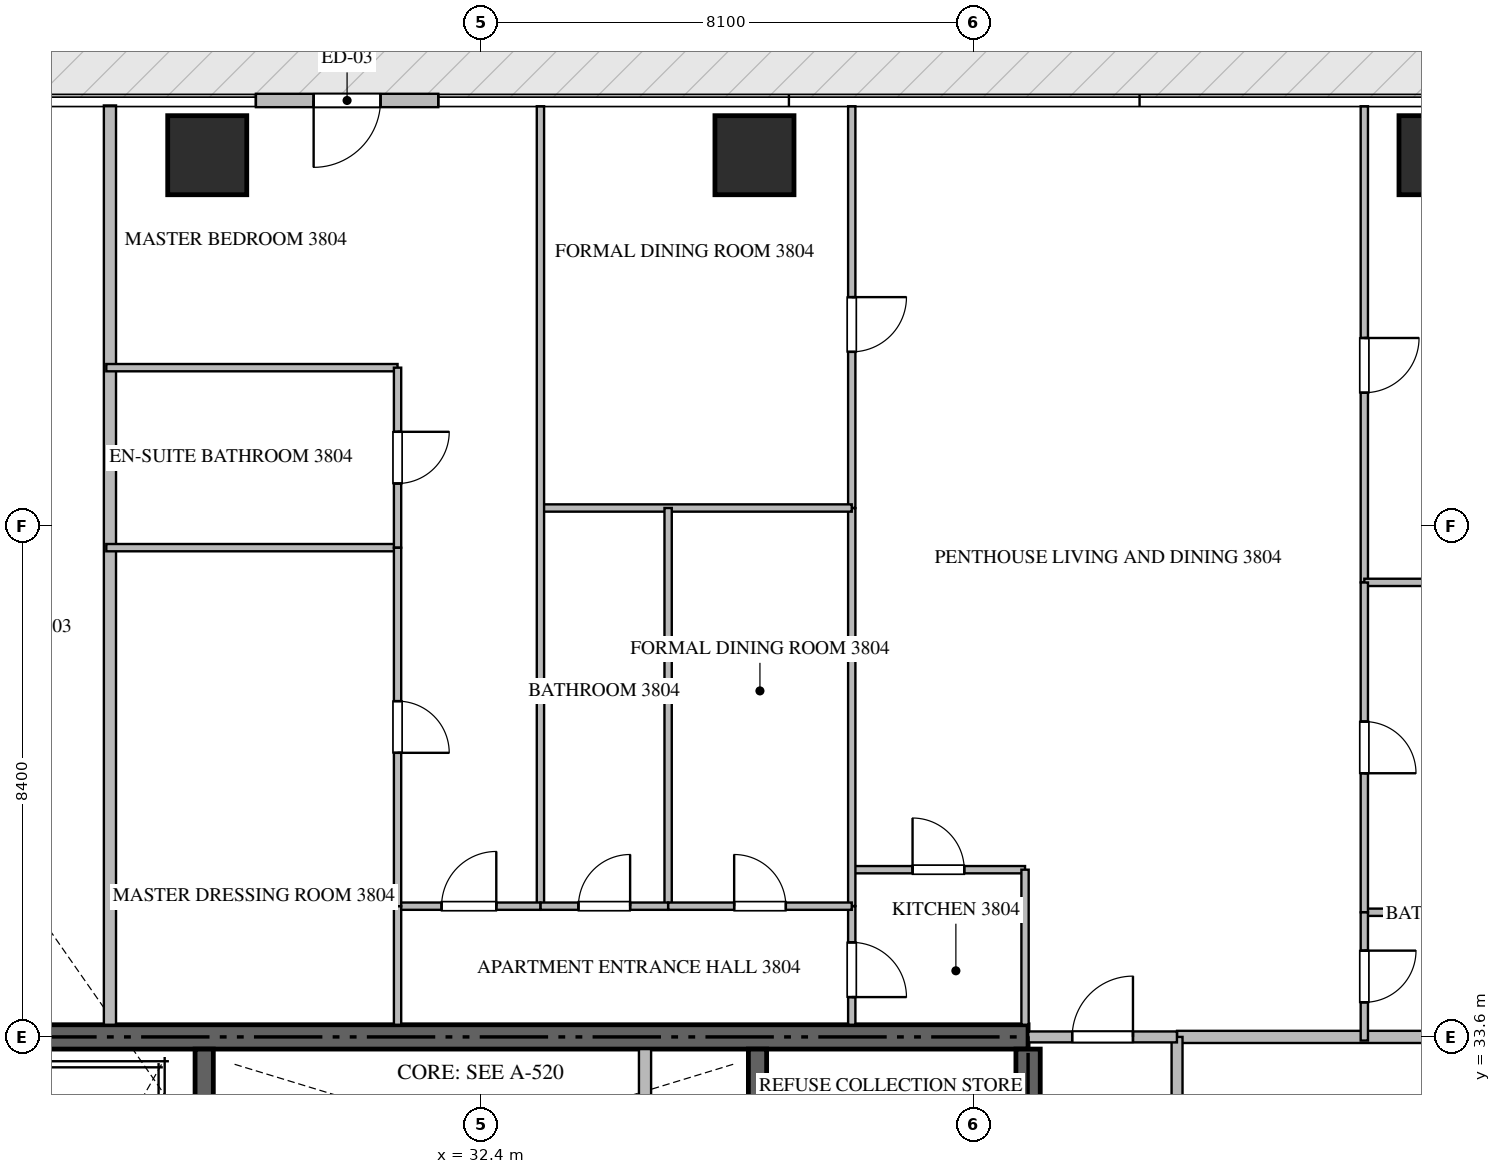
"""IFC4 building model, lengths in metres.
Left out: names, types, materials, properties, quantities, classifications, styles, units other than length and angle.
Written with IfcOpenShell. Run it as: python <this file> out.ifc"""

import sys

from ifc_helpers import new_model, si_unit, direction, frame, frame_2d, origin, origin_2d, place, context, subcontext, project, spatial, rectangle, extrude, source, transform, mapped, element, fill, save


model = new_model("IFC4")
c1 = context("Model", 3, precision=1e-05, world=origin(), true_north=direction((0.0, 1.0)))
c2 = subcontext(c1, "Body", "Model", "MODEL_VIEW")
j1 = project(units=[si_unit("LENGTHUNIT", "METRE"), si_unit("PLANEANGLEUNIT", "RADIAN")], contexts=[c1])
p1 = place(None, origin())
s1 = spatial("IfcSite", under=j1, at=p1, CompositionType="ELEMENT")
p2 = place(p1, origin())
s2 = spatial("IfcBuilding", under=s1, at=p2, CompositionType="ELEMENT")
p3 = place(p2, frame((0.0, 0.0, 153.9)))
s3 = spatial("IfcBuildingStorey", under=s2, at=p3, CompositionType="ELEMENT", Elevation=153.9)
p4 = place(p3, frame((41.4, 33.6, -0.26), z_axis=(0.0, 0.0, 1.0), x_axis=(-1.0, 0.0, 0.0)))
e1 = element("IfcWall", 1, at=p4, inside=s3, PredefinedType="SHEAR", context=c2, shape_type="SweptSolid", body=[
    extrude(rectangle(XDim=18.0, YDim=0.4, at=frame_2d((9.0, 0.0))), origin(), (0.0, 0.0, 1.0), 3.748),
])
p5 = place(p3, frame((41.4, 27.75, -0.26), z_axis=(0.0, 0.0, 1.0), x_axis=(0.0, 1.0, 0.0)))
e2 = element("IfcWall", 2, at=p5, inside=s3, PredefinedType="SHEAR", context=c2, shape_type="SweptSolid", body=[
    extrude(rectangle(XDim=5.65, YDim=0.4, at=frame_2d((2.825, 0.0))), origin(), (0.0, 0.0, 1.0), 3.748),
])
p6 = place(p3, frame((27.85, 23.55, -0.26), z_axis=(0.0, 0.0, 1.0), x_axis=(0.0, 1.0, 0.0)))
e3 = element("IfcWall", 3, at=p6, inside=s3, PredefinedType="SHEAR", context=c2, shape_type="SweptSolid", body=[
    extrude(rectangle(XDim=9.85, YDim=0.3, at=frame_2d((4.925, 0.0))), origin(), (0.0, 0.0, 1.0), 3.748),
])
p7 = place(p3, frame((36.95, 27.05, -0.26), z_axis=(0.0, 0.0, 1.0), x_axis=(0.0, 1.0, 0.0)))
e4 = element("IfcWall", 4, at=p7, inside=s3, PredefinedType="SHEAR", context=c2, shape_type="SweptSolid", body=[
    extrude(rectangle(XDim=6.35, YDim=0.3, at=frame_2d((3.175, 0.0))), origin(), (0.0, 0.0, 1.0), 3.748),
])
m1 = source(origin(), c2, "Body", "SweptSolid", [
    extrude(rectangle(XDim=1.3, YDim=1.3, at=origin_2d()), origin(), (0.0, 0.0, 1.0), 3.75),
])
for number, where, z_axis, x_axis in (
    (5, (27.9, 48.1, -0.26), (0.0, 0.0, 1.0), (1.0, 0.0, 0.0)),
    (6, (36.9, 48.1, -0.26), (0.0, 0.0, 1.0), (1.0, 0.0, 0.0)),
    (7, (48.15, 48.1, -0.26), (0.0, 0.0, 1.0), (1.0, 0.0, 0.0)),
):
    element("IfcColumn", number, at=place(p3, frame(where, z_axis=z_axis, x_axis=x_axis)), inside=s3, PredefinedType="COLUMN", context=c2, shape_type="MappedRepresentation", body=[
        mapped(m1, transform((0.0, 0.0, 0.0), scale=1.0)),
    ])
p8 = place(p3, frame((31.7, 49.0, 0.0), z_axis=(0.0, 0.0, 1.0), x_axis=(-1.0, 0.0, 0.0)))
e8 = element("IfcWall", 8, at=p8, inside=s3, PredefinedType="ELEMENTEDWALL", context=c2, shape_type="SweptSolid", body=[
    extrude(rectangle(XDim=3.0, YDim=0.22, at=frame_2d((1.5, 0.0))), origin(), (0.0, 0.0, 1.0), 3.475),
])
p9 = place(p8, frame((0.95, 0.0, 0.0)))
e9 = element("IfcOpeningElement", 9, at=p9, cuts=e8, PredefinedType="OPENING", context=c2, shape_type="SweptSolid", body=[
    extrude(rectangle(XDim=1.1, YDim=2.2, at=frame_2d((0.55, 1.1))), frame((0.0, 0.12, 0.0), z_axis=(0.0, -1.0, 0.0), x_axis=(1.0, 0.0, 0.0)), (0.0, 0.0, 1.0), 0.24),
])
p10 = place(p3, frame((35.1, 30.75, 0.0), z_axis=(0.0, 0.0, 1.0), x_axis=(0.0, 1.0, 0.0)))
e10 = element("IfcWall", 10, at=p10, inside=s3, PredefinedType="STANDARD", context=c2, shape_type="SweptSolid", body=[
    extrude(rectangle(XDim=2.65, YDim=0.2, at=frame_2d((1.325, 0.0))), origin(), (0.0, 0.0, 1.0), 3.49),
])
p11 = place(p3, frame((26.3, 33.8, 0.0), z_axis=(0.0, 0.0, 1.0), x_axis=(0.0, 1.0, 0.0)))
e11 = element("IfcWall", 11, at=p11, inside=s3, PredefinedType="PARTITIONING", context=c2, shape_type="SweptSolid", body=[
    extrude(rectangle(XDim=15.118, YDim=0.2, at=frame_2d((7.559, 0.0))), origin(), (0.0, 0.0, 1.0), 3.49),
])
p12 = place(p3, frame((43.85, 33.6, 0.0), z_axis=(0.0, 0.0, 1.0), x_axis=(1.0, 0.0, 0.0)))
e12 = element("IfcWall", 12, at=p12, inside=s3, PredefinedType="PARTITIONING", context=c2, shape_type="SweptSolid", body=[
    extrude(rectangle(XDim=13.068, YDim=0.2, at=frame_2d((6.534, 0.0))), origin(), (0.0, 0.0, 1.0), 3.49),
])
p13 = place(p3, frame((43.85, 14.9, 0.0), z_axis=(0.0, 0.0, 1.0), x_axis=(0.0, 1.0, 0.0)))
e13 = element("IfcWall", 13, at=p13, inside=s3, PredefinedType="PARTITIONING", context=c2, shape_type="SweptSolid", body=[
    extrude(rectangle(XDim=18.7, YDim=0.18, at=frame_2d((9.35, 0.0))), origin(), (0.0, 0.0, 1.0), 3.49),
])
p14 = place(p13, frame((1.805, 0.0, 0.0)))
e14 = element("IfcOpeningElement", 14, at=p14, cuts=e13, PredefinedType="OPENING", context=c2, shape_type="SweptSolid", body=[
    extrude(rectangle(XDim=1.0, YDim=2.15, at=frame_2d((0.5, 1.075))), frame((0.0, 0.1, 0.0), z_axis=(0.0, -1.0, 0.0), x_axis=(1.0, 0.0, 0.0)), (0.0, 0.0, 1.0), 0.2),
])
p15 = place(p3, frame((41.402, 33.6, 0.0), z_axis=(0.0, 0.0, 1.0), x_axis=(1.0, 0.0, 0.0)))
e15 = element("IfcWall", 15, at=p15, inside=s3, PredefinedType="PARTITIONING", context=c2, shape_type="SweptSolid", body=[
    extrude(rectangle(XDim=2.446, YDim=0.18, at=frame_2d((1.223, 0.0))), origin(), (0.0, 0.0, 1.0), 3.49),
])
p16 = place(p15, frame((0.723, 0.0, 0.0)))
e16 = element("IfcOpeningElement", 16, at=p16, cuts=e15, PredefinedType="OPENING", context=c2, shape_type="SweptSolid", body=[
    extrude(rectangle(XDim=1.0, YDim=2.15, at=frame_2d((0.5, 1.075))), frame((0.0, 0.1, 0.0), z_axis=(0.0, -1.0, 0.0), x_axis=(1.0, 0.0, 0.0)), (0.0, 0.0, 1.0), 0.2),
])
p17 = place(p3, frame((38.5, 36.35, 0.0), z_axis=(0.0, 0.0, 1.0), x_axis=(1.0, 0.0, 0.0)))
e17 = element("IfcWall", 17, at=p17, inside=s3, PredefinedType="PARTITIONING", context=c2, shape_type="SweptSolid", body=[
    extrude(rectangle(XDim=2.85, YDim=0.12, at=frame_2d((1.425, 0.0))), origin(), (0.0, 0.0, 1.0), 3.49),
])
p18 = place(p17, frame((1.0, 0.0, 0.0)))
e18 = element("IfcOpeningElement", 18, at=p18, cuts=e17, PredefinedType="OPENING", context=c2, shape_type="SweptSolid", body=[
    extrude(rectangle(XDim=0.85, YDim=2.1, at=frame_2d((0.425, 1.05))), frame((0.0, 0.07, 0.0), z_axis=(0.0, -1.0, 0.0), x_axis=(1.0, 0.0, 0.0)), (0.0, 0.0, 1.0), 0.14),
])
p19 = place(p3, frame((41.35, 36.35, 0.0), z_axis=(0.0, 0.0, 1.0), x_axis=(0.0, -1.0, 0.0)))
e19 = element("IfcWall", 19, at=p19, inside=s3, PredefinedType="PARTITIONING", context=c2, shape_type="SweptSolid", body=[
    extrude(rectangle(XDim=2.55, YDim=0.12, at=frame_2d((1.275, 0.0))), origin(), (0.0, 0.0, 1.0), 3.49),
])
p20 = place(p3, frame((38.5, 35.75, 0.0), z_axis=(0.0, 0.0, 1.0), x_axis=(0.0, -1.0, 0.0)))
e20 = element("IfcWall", 20, at=p20, inside=s3, PredefinedType="PARTITIONING", context=c2, shape_type="SweptSolid", body=[
    extrude(rectangle(XDim=1.95, YDim=0.12, at=frame_2d((0.975, 0.0))), origin(), (0.0, 0.0, 1.0), 3.49),
])
p21 = place(p20, frame((0.595, 0.0, 0.0)))
e21 = element("IfcOpeningElement", 21, at=p21, cuts=e20, PredefinedType="OPENING", context=c2, shape_type="SweptSolid", body=[
    extrude(rectangle(XDim=0.9, YDim=2.1, at=frame_2d((0.45, 1.05))), frame((0.0, 0.07, 0.0), z_axis=(0.0, -1.0, 0.0), x_axis=(1.0, 0.0, 0.0)), (0.0, 0.0, 1.0), 0.14),
])
p22 = place(p3, frame((38.5, 48.905, 0.0), z_axis=(0.0, 0.0, 1.0), x_axis=(0.0, -1.0, 0.0)))
e22 = element("IfcWall", 22, at=p22, inside=s3, PredefinedType="PARTITIONING", context=c2, shape_type="SweptSolid", body=[
    extrude(rectangle(XDim=6.607, YDim=0.12, at=frame_2d((3.303, 0.0))), origin(), (0.0, 0.0, 1.0), 3.49),
])
p23 = place(p22, frame((3.139, 0.0, 0.0)))
e23 = element("IfcOpeningElement", 23, at=p23, cuts=e22, PredefinedType="OPENING", context=c2, shape_type="SweptSolid", body=[
    extrude(rectangle(XDim=0.9, YDim=2.1, at=frame_2d((0.45, 1.05))), frame((0.0, 0.07, 0.0), z_axis=(0.0, -1.0, 0.0), x_axis=(1.0, 0.0, 0.0)), (0.0, 0.0, 1.0), 0.14),
])
p24 = place(p3, frame((38.5, 42.296, 0.0), z_axis=(0.0, 0.0, 1.0), x_axis=(0.0, -1.0, 0.0)))
e24 = element("IfcWall", 24, at=p24, inside=s3, PredefinedType="PARTITIONING", context=c2, shape_type="SweptSolid", body=[
    extrude(rectangle(XDim=6.544, YDim=0.12, at=frame_2d((3.272, 0.0))), origin(), (0.0, 0.0, 1.0), 3.49),
])
p25 = place(p3, frame((33.38, 42.298, 0.0), z_axis=(0.0, 0.0, 1.0), x_axis=(1.0, 0.0, 0.0)))
e25 = element("IfcWall", 25, at=p25, inside=s3, PredefinedType="PARTITIONING", context=c2, shape_type="SweptSolid", body=[
    extrude(rectangle(XDim=5.12, YDim=0.12, at=frame_2d((2.56, 0.0))), origin(), (0.0, 0.0, 1.0), 3.49),
])
p26 = place(p3, frame((33.38, 48.905, 0.0), z_axis=(0.0, 0.0, 1.0), x_axis=(0.0, -1.0, 0.0)))
e26 = element("IfcWall", 26, at=p26, inside=s3, PredefinedType="PARTITIONING", context=c2, shape_type="SweptSolid", body=[
    extrude(rectangle(XDim=13.155, YDim=0.12, at=frame_2d((6.578, 0.0))), origin(), (0.0, 0.0, 1.0), 3.49),
])
p27 = place(p3, frame((35.48, 42.298, 0.0), z_axis=(0.0, 0.0, 1.0), x_axis=(0.0, -1.0, 0.0)))
e27 = element("IfcWall", 27, at=p27, inside=s3, PredefinedType="PARTITIONING", context=c2, shape_type="SweptSolid", body=[
    extrude(rectangle(XDim=6.548, YDim=0.12, at=frame_2d((3.274, 0.0))), origin(), (0.0, 0.0, 1.0), 3.49),
])
p28 = place(p3, frame((33.38, 35.75, 0.0), z_axis=(0.0, 0.0, 1.0), x_axis=(1.0, 0.0, 0.0)))
e28 = element("IfcWall", 28, at=p28, inside=s3, PredefinedType="PARTITIONING", context=c2, shape_type="SweptSolid", body=[
    extrude(rectangle(XDim=2.1, YDim=0.12, at=frame_2d((1.05, 0.0))), origin(), (0.0, 0.0, 1.0), 3.49),
])
p29 = place(p28, frame((0.625, 0.0, 0.0)))
e29 = element("IfcOpeningElement", 29, at=p29, cuts=e28, PredefinedType="OPENING", context=c2, shape_type="SweptSolid", body=[
    extrude(rectangle(XDim=0.85, YDim=2.1, at=frame_2d((0.425, 1.05))), frame((0.0, 0.07, 0.0), z_axis=(0.0, -1.0, 0.0), x_axis=(1.0, 0.0, 0.0)), (0.0, 0.0, 1.0), 0.14),
])
p30 = place(p3, frame((35.482, 35.75, 0.0), z_axis=(0.0, 0.0, 1.0), x_axis=(1.0, 0.0, 0.0)))
e30 = element("IfcWall", 30, at=p30, inside=s3, PredefinedType="PARTITIONING", context=c2, shape_type="SweptSolid", body=[
    extrude(rectangle(XDim=3.018, YDim=0.12, at=frame_2d((1.509, 0.0))), origin(), (0.0, 0.0, 1.0), 3.49),
])
p31 = place(p30, frame((1.084, 0.0, 0.0)))
e31 = element("IfcOpeningElement", 31, at=p31, cuts=e30, PredefinedType="OPENING", context=c2, shape_type="SweptSolid", body=[
    extrude(rectangle(XDim=0.85, YDim=2.1, at=frame_2d((0.425, 1.05))), frame((0.0, 0.07, 0.0), z_axis=(0.0, -1.0, 0.0), x_axis=(1.0, 0.0, 0.0)), (0.0, 0.0, 1.0), 0.14),
])
p32 = place(p3, frame((31.03, 35.75, 0.0), z_axis=(0.0, 0.0, 1.0), x_axis=(1.0, 0.0, 0.0)))
e32 = element("IfcWall", 32, at=p32, inside=s3, PredefinedType="PARTITIONING", context=c2, shape_type="SweptSolid", body=[
    extrude(rectangle(XDim=2.348, YDim=0.12, at=frame_2d((1.174, 0.0))), origin(), (0.0, 0.0, 1.0), 3.49),
])
p33 = place(p32, frame((0.724, 0.0, 0.0)))
e33 = element("IfcOpeningElement", 33, at=p33, cuts=e32, PredefinedType="OPENING", context=c2, shape_type="SweptSolid", body=[
    extrude(rectangle(XDim=0.9, YDim=2.1, at=frame_2d((0.45, 1.05))), frame((0.0, 0.07, 0.0), z_axis=(0.0, -1.0, 0.0), x_axis=(1.0, 0.0, 0.0)), (0.0, 0.0, 1.0), 0.14),
])
for number, where, z_axis, x_axis in (
    (34, (26.24, 44.606, 0.0), (0.0, 0.0, 1.0), (1.0, 0.0, 0.0)),
    (35, (26.24, 41.646, 0.0), (0.0, 0.0, 1.0), (1.0, 0.0, 0.0)),
):
    element("IfcWall", number, at=place(p3, frame(where, z_axis=z_axis, x_axis=x_axis)), inside=s3, PredefinedType="PARTITIONING", context=c2, shape_type="SweptSolid", body=[
        extrude(rectangle(XDim=4.79, YDim=0.12, at=frame_2d((2.395, 0.0))), origin(), (0.0, 0.0, 1.0), 3.49),
    ])
p34 = place(p3, frame((31.03, 44.606, 0.0), z_axis=(0.0, 0.0, 1.0), x_axis=(0.0, -1.0, 0.0)))
e36 = element("IfcWall", 36, at=p34, inside=s3, PredefinedType="PARTITIONING", context=c2, shape_type="SweptSolid", body=[
    extrude(rectangle(XDim=2.96, YDim=0.12, at=frame_2d((1.48, 0.0))), origin(), (0.0, 0.0, 1.0), 3.49),
])
p35 = place(p34, frame((1.055, 0.0, 0.0)))
e37 = element("IfcOpeningElement", 37, at=p35, cuts=e36, PredefinedType="OPENING", context=c2, shape_type="SweptSolid", body=[
    extrude(rectangle(XDim=0.85, YDim=2.1, at=frame_2d((0.425, 1.05))), frame((0.0, 0.07, 0.0), z_axis=(0.0, -1.0, 0.0), x_axis=(1.0, 0.0, 0.0)), (0.0, 0.0, 1.0), 0.14),
])
p36 = place(p3, frame((31.03, 41.644, 0.0), z_axis=(0.0, 0.0, 1.0), x_axis=(0.0, -1.0, 0.0)))
e38 = element("IfcWall", 38, at=p36, inside=s3, PredefinedType="PARTITIONING", context=c2, shape_type="SweptSolid", body=[
    extrude(rectangle(XDim=5.894, YDim=0.12, at=frame_2d((2.947, 0.0))), origin(), (0.0, 0.0, 1.0), 3.49),
])
p37 = place(p36, frame((2.522, 0.0, 0.0)))
e39 = element("IfcOpeningElement", 39, at=p37, cuts=e38, PredefinedType="OPENING", context=c2, shape_type="SweptSolid", body=[
    extrude(rectangle(XDim=0.85, YDim=2.1, at=frame_2d((0.425, 1.05))), frame((0.0, 0.07, 0.0), z_axis=(0.0, -1.0, 0.0), x_axis=(1.0, 0.0, 0.0)), (0.0, 0.0, 1.0), 0.14),
])
p38 = place(p3, frame((31.03, 35.748, 0.0), z_axis=(0.0, 0.0, 1.0), x_axis=(0.0, -1.0, 0.0)))
e40 = element("IfcWall", 40, at=p38, inside=s3, PredefinedType="PARTITIONING", context=c2, shape_type="SweptSolid", body=[
    extrude(rectangle(XDim=1.948, YDim=0.12, at=frame_2d((0.974, 0.0))), origin(), (0.0, 0.0, 1.0), 3.49),
])
p39 = place(p3, frame((46.93, 48.905, 0.0), z_axis=(0.0, 0.0, 1.0), x_axis=(0.0, -1.0, 0.0)))
e41 = element("IfcWall", 41, at=p39, inside=s3, PredefinedType="PARTITIONING", context=c2, shape_type="SweptSolid", body=[
    extrude(rectangle(XDim=7.83, YDim=0.12, at=frame_2d((3.915, 0.0))), origin(), (0.0, 0.0, 1.0), 3.49),
])
p40 = place(p39, frame((3.811, 0.0, 0.0)))
e42 = element("IfcOpeningElement", 42, at=p40, cuts=e41, PredefinedType="OPENING", context=c2, shape_type="SweptSolid", body=[
    extrude(rectangle(XDim=0.9, YDim=2.1, at=frame_2d((0.45, 1.05))), frame((0.0, 0.07, 0.0), z_axis=(0.0, -1.0, 0.0), x_axis=(1.0, 0.0, 0.0)), (0.0, 0.0, 1.0), 0.14),
])
p41 = place(p3, frame((46.93, 41.075, 0.0), z_axis=(0.0, 0.0, 1.0), x_axis=(1.0, 0.0, 0.0)))
e43 = element("IfcWall", 43, at=p41, inside=s3, PredefinedType="PARTITIONING", context=c2, shape_type="SweptSolid", body=[
    extrude(rectangle(XDim=5.975, YDim=0.12, at=frame_2d((2.988, 0.0))), origin(), (0.0, 0.0, 1.0), 3.49),
])
p42 = place(p3, frame((46.93, 35.65, 0.0), z_axis=(0.0, 0.0, 1.0), x_axis=(1.0, 0.0, 0.0)))
e44 = element("IfcWall", 44, at=p42, inside=s3, PredefinedType="PARTITIONING", context=c2, shape_type="SweptSolid", body=[
    extrude(rectangle(XDim=3.2, YDim=0.12, at=frame_2d((1.6, 0.0))), origin(), (0.0, 0.0, 1.0), 3.49),
])
p43 = place(p3, frame((46.93, 41.073, 0.0), z_axis=(0.0, 0.0, 1.0), x_axis=(0.0, -1.0, 0.0)))
e45 = element("IfcWall", 45, at=p43, inside=s3, PredefinedType="PARTITIONING", context=c2, shape_type="SweptSolid", body=[
    extrude(rectangle(XDim=5.423, YDim=0.12, at=frame_2d((2.711, 0.0))), origin(), (0.0, 0.0, 1.0), 3.49),
])
p44 = place(p43, frame((2.287, 0.0, 0.0)))
e46 = element("IfcOpeningElement", 46, at=p44, cuts=e45, PredefinedType="OPENING", context=c2, shape_type="SweptSolid", body=[
    extrude(rectangle(XDim=0.85, YDim=2.1, at=frame_2d((0.425, 1.05))), frame((0.0, 0.07, 0.0), z_axis=(0.0, -1.0, 0.0), x_axis=(1.0, 0.0, 0.0)), (0.0, 0.0, 1.0), 0.14),
])
p45 = place(p3, frame((46.93, 35.648, 0.0), z_axis=(0.0, 0.0, 1.0), x_axis=(0.0, -1.0, 0.0)))
e47 = element("IfcWall", 47, at=p45, inside=s3, PredefinedType="PARTITIONING", context=c2, shape_type="SweptSolid", body=[
    extrude(rectangle(XDim=2.108, YDim=0.12, at=frame_2d((1.054, 0.0))), origin(), (0.0, 0.0, 1.0), 3.49),
])
p46 = place(p45, frame((0.629, 0.0, 0.0)))
e48 = element("IfcOpeningElement", 48, at=p46, cuts=e47, PredefinedType="OPENING", context=c2, shape_type="SweptSolid", body=[
    extrude(rectangle(XDim=0.85, YDim=2.1, at=frame_2d((0.425, 1.05))), frame((0.0, 0.07, 0.0), z_axis=(0.0, -1.0, 0.0), x_axis=(1.0, 0.0, 0.0)), (0.0, 0.0, 1.0), 0.14),
])
m2 = source(origin(), c2, "Body", "SweptSolid", [
    extrude(rectangle(XDim=1.1, YDim=2.2, at=frame_2d((0.55, 1.1))), frame((0.0, 0.025, 0.0), z_axis=(0.0, -1.0, 0.0), x_axis=(1.0, 0.0, 0.0)), (0.0, 0.0, 1.0), 0.05),
])
p47 = place(p9, origin())
e49 = element("IfcDoor", 49, at=p47, inside=s3, OperationType="SINGLE_SWING_RIGHT", PredefinedType="DOOR", context=c2, shape_type="MappedRepresentation", body=[
    mapped(m2, transform((0.0, 0.0, 0.0), scale=1.0)),
])
fill(e9, e49)
m3 = source(origin(), c2, "Body", "SweptSolid", [
    extrude(rectangle(XDim=1.0, YDim=2.15, at=frame_2d((0.5, 1.075))), frame((0.0, 0.025, 0.0), z_axis=(0.0, -1.0, 0.0), x_axis=(1.0, 0.0, 0.0)), (0.0, 0.0, 1.0), 0.05),
])
p48 = place(p16, origin())
e50 = element("IfcDoor", 50, at=p48, inside=s3, OperationType="SINGLE_SWING_RIGHT", PredefinedType="DOOR", context=c2, shape_type="MappedRepresentation", body=[
    mapped(m3, transform((0.0, 0.0, 0.0), scale=1.0)),
])
fill(e16, e50)
m4 = source(origin(), c2, "Body", "SweptSolid", [
    extrude(rectangle(XDim=0.85, YDim=2.1, at=frame_2d((0.425, 1.05))), frame((0.0, 0.025, 0.0), z_axis=(0.0, -1.0, 0.0), x_axis=(1.0, 0.0, 0.0)), (0.0, 0.0, 1.0), 0.05),
])
p49 = place(p18, origin())
e51 = element("IfcDoor", 51, at=p49, inside=s3, OperationType="SINGLE_SWING_LEFT", PredefinedType="DOOR", context=c2, shape_type="MappedRepresentation", body=[
    mapped(m4, transform((0.0, 0.0, 0.0), scale=1.0)),
])
fill(e18, e51)
m5 = source(origin(), c2, "Body", "SweptSolid", [
    extrude(rectangle(XDim=0.9, YDim=2.1, at=frame_2d((0.45, 1.05))), frame((0.0, 0.025, 0.0), z_axis=(0.0, -1.0, 0.0), x_axis=(1.0, 0.0, 0.0)), (0.0, 0.0, 1.0), 0.05),
])
p50 = place(p21, origin())
e52 = element("IfcDoor", 52, at=p50, inside=s3, OperationType="SINGLE_SWING_RIGHT", PredefinedType="DOOR", context=c2, shape_type="MappedRepresentation", body=[
    mapped(m5, transform((0.0, 0.0, 0.0), scale=1.0)),
])
fill(e21, e52)
p51 = place(p23, origin())
e53 = element("IfcDoor", 53, at=p51, inside=s3, OperationType="SINGLE_SWING_LEFT", PredefinedType="DOOR", context=c2, shape_type="MappedRepresentation", body=[
    mapped(m5, transform((0.0, 0.0, 0.0), scale=1.0)),
])
fill(e23, e53)
p52 = place(p29, origin())
e54 = element("IfcDoor", 54, at=p52, inside=s3, OperationType="SINGLE_SWING_RIGHT", PredefinedType="DOOR", context=c2, shape_type="MappedRepresentation", body=[
    mapped(m4, transform((0.0, 0.0, 0.0), scale=1.0)),
])
fill(e29, e54)
p53 = place(p31, origin())
e55 = element("IfcDoor", 55, at=p53, inside=s3, OperationType="SINGLE_SWING_LEFT", PredefinedType="DOOR", context=c2, shape_type="MappedRepresentation", body=[
    mapped(m4, transform((0.0, 0.0, 0.0), scale=1.0)),
])
fill(e31, e55)
p54 = place(p33, origin())
e56 = element("IfcDoor", 56, at=p54, inside=s3, OperationType="SINGLE_SWING_RIGHT", PredefinedType="DOOR", context=c2, shape_type="MappedRepresentation", body=[
    mapped(m5, transform((0.0, 0.0, 0.0), scale=1.0)),
])
fill(e33, e56)
p55 = place(p35, origin())
e57 = element("IfcDoor", 57, at=p55, inside=s3, OperationType="SINGLE_SWING_LEFT", PredefinedType="DOOR", context=c2, shape_type="MappedRepresentation", body=[
    mapped(m4, transform((0.0, 0.0, 0.0), scale=1.0)),
])
fill(e37, e57)
p56 = place(p37, origin())
e58 = element("IfcDoor", 58, at=p56, inside=s3, OperationType="SINGLE_SWING_RIGHT", PredefinedType="DOOR", context=c2, shape_type="MappedRepresentation", body=[
    mapped(m4, transform((0.0, 0.0, 0.0), scale=1.0)),
])
fill(e39, e58)
p57 = place(p40, origin())
e59 = element("IfcDoor", 59, at=p57, inside=s3, OperationType="SINGLE_SWING_LEFT", PredefinedType="DOOR", context=c2, shape_type="MappedRepresentation", body=[
    mapped(m5, transform((0.0, 0.0, 0.0), scale=1.0)),
])
fill(e42, e59)
p58 = place(p44, origin())
e60 = element("IfcDoor", 60, at=p58, inside=s3, OperationType="SINGLE_SWING_RIGHT", PredefinedType="DOOR", context=c2, shape_type="MappedRepresentation", body=[
    mapped(m4, transform((0.0, 0.0, 0.0), scale=1.0)),
])
fill(e46, e60)
p59 = place(p46, origin())
e61 = element("IfcDoor", 61, at=p59, inside=s3, OperationType="SINGLE_SWING_LEFT", PredefinedType="DOOR", context=c2, shape_type="MappedRepresentation", body=[
    mapped(m4, transform((0.0, 0.0, 0.0), scale=1.0)),
])
fill(e48, e61)
save(model, sys.argv[1])
